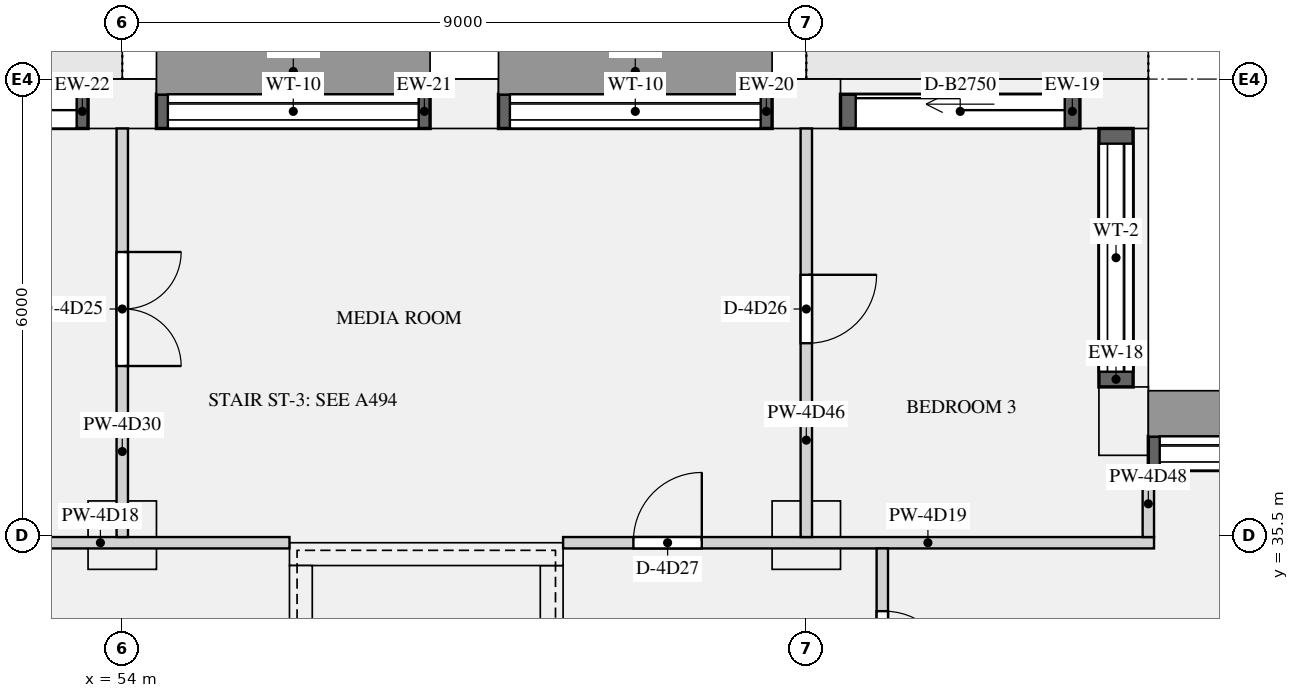
"""IFC4 building model, lengths in metres.
Left out: names, types, materials, properties, quantities, classifications, styles, units other than length and angle.
Written with IfcOpenShell. Run it as: python <this file> out.ifc"""

import sys

from ifc_helpers import new_model, si_unit, direction, frame, frame_2d, origin, origin_2d, place, context, subcontext, project, spatial, rectangle, extrude, element, fill, save


model = new_model("IFC4")
c1 = context("Model", 3, precision=1e-05, world=origin(), true_north=direction((0.0, 1.0)))
c2 = subcontext(c1, "Body", "Model", "MODEL_VIEW")
j1 = project(units=[si_unit("LENGTHUNIT", "METRE"), si_unit("PLANEANGLEUNIT", "RADIAN")], contexts=[c1])
p1 = place(None, origin())
s1 = spatial("IfcSite", under=j1, at=p1, CompositionType="ELEMENT")
p2 = place(p1, origin())
s2 = spatial("IfcBuilding", under=s1, at=p2, CompositionType="ELEMENT")
p3 = place(p2, frame((0.0, 0.0, 223.2)))
s3 = spatial("IfcBuildingStorey", under=s2, at=p3, CompositionType="ELEMENT", Elevation=223.2)
for number, where, z_axis, x_axis in (
    (1, (67.175, 37.0, 0.0), (0.0, 0.0, 1.0), (0.0, 1.0, 0.0)),
    (2, (67.05, 41.175, 0.0), (0.0, 0.0, 1.0), (-1.0, 0.0, 0.0)),
    (3, (63.0, 41.175, 0.0), (0.0, 0.0, 1.0), (-1.0, 0.0, 0.0)),
    (4, (58.5, 41.175, 0.0), (0.0, 0.0, 1.0), (-1.0, 0.0, 0.0)),
    (5, (54.0, 41.175, 0.0), (0.0, 0.0, 1.0), (-1.0, 0.0, 0.0)),
):
    element("IfcColumn", number, at=place(p3, frame(where, z_axis=z_axis, x_axis=x_axis)), inside=s3, PredefinedType="USERDEFINED", context=c2, shape_type="SweptSolid", body=[
        extrude(rectangle(XDim=0.9, YDim=0.65, at=origin_2d()), origin(), (0.0, 0.0, 1.0), 3.15),
    ])
for number, where, z_axis, x_axis in (
    (6, (54.0, 35.5, 0.0), (0.0, 0.0, 1.0), (1.0, 0.0, 0.0)),
    (7, (63.0, 35.5, 0.0), (0.0, 0.0, 1.0), (1.0, 0.0, 0.0)),
):
    element("IfcColumn", number, at=place(p3, frame(where, z_axis=z_axis, x_axis=x_axis)), inside=s3, PredefinedType="COLUMN", context=c2, shape_type="SweptSolid", body=[
        extrude(rectangle(XDim=0.9, YDim=0.9, at=origin_2d()), origin(), (0.0, 0.0, 1.0), 3.15),
    ])
p4 = place(p3, frame((56.2, 35.25, 0.0), z_axis=(0.0, 0.0, 1.0), x_axis=(1.0, 0.0, 0.0)))
e8 = element("IfcWall", 8, at=p4, inside=s3, PredefinedType="SHEAR", context=c2, shape_type="SweptSolid", body=[
    extrude(rectangle(XDim=3.6, YDim=0.3, at=frame_2d((1.8, 0.0))), origin(), (0.0, 0.0, 1.0), 3.15),
])
for number, where, z_axis, x_axis in (
    (9, (56.35, 27.3, 0.0), (0.0, 0.0, 1.0), (0.0, 1.0, 0.0)),
    (10, (59.65, 27.3, 0.0), (0.0, 0.0, 1.0), (0.0, 1.0, 0.0)),
):
    element("IfcWall", number, at=place(p3, frame(where, z_axis=z_axis, x_axis=x_axis)), inside=s3, PredefinedType="SHEAR", context=c2, shape_type="SweptSolid", body=[
        extrude(rectangle(XDim=7.8, YDim=0.3, at=frame_2d((3.9, 0.0))), origin(), (0.0, 0.0, 1.0), 3.15),
    ])
p5 = place(p3, frame((71.1, 36.575, 0.9), z_axis=(0.0, 0.0, 1.0), x_axis=(-1.0, 0.0, 0.0)))
e11 = element("IfcWall", 11, at=p5, inside=s3, PredefinedType="SOLIDWALL", context=c2, shape_type="SweptSolid", body=[
    extrude(rectangle(XDim=3.6, YDim=0.45, at=frame_2d((1.8, 0.0))), origin(), (0.0, 0.0, 1.0), 1.93),
])
p6 = place(p5, frame((0.15, 0.0, 0.15)))
e12 = element("IfcOpeningElement", 12, at=p6, cuts=e11, PredefinedType="OPENING", context=c2, shape_type="SweptSolid", body=[
    extrude(rectangle(XDim=3.3, YDim=1.5, at=frame_2d((1.65, 0.75))), frame((0.0, 0.235, 0.0), z_axis=(0.0, -1.0, 0.0), x_axis=(1.0, 0.0, 0.0)), (0.0, 0.0, 1.0), 0.47),
])
p7 = place(p3, frame((67.075, 37.45, 0.9), z_axis=(0.0, 0.0, 1.0), x_axis=(0.0, 1.0, 0.0)))
e13 = element("IfcWall", 13, at=p7, inside=s3, PredefinedType="SOLIDWALL", context=c2, shape_type="SweptSolid", body=[
    extrude(rectangle(XDim=3.4, YDim=0.45, at=frame_2d((1.7, 0.0))), origin(), (0.0, 0.0, 1.0), 1.93),
])
p8 = place(p7, frame((0.2, 0.0, 0.15)))
e14 = element("IfcOpeningElement", 14, at=p8, cuts=e13, PredefinedType="OPENING", context=c2, shape_type="SweptSolid", body=[
    extrude(rectangle(XDim=3.0, YDim=1.5, at=frame_2d((1.5, 0.75))), frame((0.0, 0.235, 0.0), z_axis=(0.0, -1.0, 0.0), x_axis=(1.0, 0.0, 0.0)), (0.0, 0.0, 1.0), 0.47),
])
p9 = place(p3, frame((66.6, 41.075, 0.0), z_axis=(0.0, 0.0, 1.0), x_axis=(-1.0, 0.0, 0.0)))
e15 = element("IfcWall", 15, at=p9, inside=s3, PredefinedType="SOLIDWALL", context=c2, shape_type="SweptSolid", body=[
    extrude(rectangle(XDim=3.15, YDim=0.45, at=frame_2d((1.575, 0.0))), origin(), (0.0, 0.0, 1.0), 2.83),
])
p10 = place(p9, frame((0.2, 0.0, 0.0)))
e16 = element("IfcOpeningElement", 16, at=p10, cuts=e15, PredefinedType="OPENING", context=c2, shape_type="SweptSolid", body=[
    extrude(rectangle(XDim=2.75, YDim=2.3, at=frame_2d((1.375, 1.15))), frame((0.0, 0.235, 0.0), z_axis=(0.0, -1.0, 0.0), x_axis=(1.0, 0.0, 0.0)), (0.0, 0.0, 1.0), 0.47),
])
p11 = place(p3, frame((62.55, 41.075, 0.9), z_axis=(0.0, 0.0, 1.0), x_axis=(-1.0, 0.0, 0.0)))
e17 = element("IfcWall", 17, at=p11, inside=s3, PredefinedType="SOLIDWALL", context=c2, shape_type="SweptSolid", body=[
    extrude(rectangle(XDim=3.6, YDim=0.45, at=frame_2d((1.8, 0.0))), origin(), (0.0, 0.0, 1.0), 1.93),
])
p12 = place(p11, frame((0.15, 0.0, 0.15)))
e18 = element("IfcOpeningElement", 18, at=p12, cuts=e17, PredefinedType="OPENING", context=c2, shape_type="SweptSolid", body=[
    extrude(rectangle(XDim=3.3, YDim=1.5, at=frame_2d((1.65, 0.75))), frame((0.0, 0.235, 0.0), z_axis=(0.0, -1.0, 0.0), x_axis=(1.0, 0.0, 0.0)), (0.0, 0.0, 1.0), 0.47),
])
p13 = place(p3, frame((58.05, 41.075, 0.9), z_axis=(0.0, 0.0, 1.0), x_axis=(-1.0, 0.0, 0.0)))
e19 = element("IfcWall", 19, at=p13, inside=s3, PredefinedType="SOLIDWALL", context=c2, shape_type="SweptSolid", body=[
    extrude(rectangle(XDim=3.6, YDim=0.45, at=frame_2d((1.8, 0.0))), origin(), (0.0, 0.0, 1.0), 1.93),
])
p14 = place(p13, frame((0.15, 0.0, 0.15)))
e20 = element("IfcOpeningElement", 20, at=p14, cuts=e19, PredefinedType="OPENING", context=c2, shape_type="SweptSolid", body=[
    extrude(rectangle(XDim=3.3, YDim=1.5, at=frame_2d((1.65, 0.75))), frame((0.0, 0.235, 0.0), z_axis=(0.0, -1.0, 0.0), x_axis=(1.0, 0.0, 0.0)), (0.0, 0.0, 1.0), 0.47),
])
p15 = place(p3, frame((53.55, 41.075, 0.0), z_axis=(0.0, 0.0, 1.0), x_axis=(-1.0, 0.0, 0.0)))
e21 = element("IfcWall", 21, at=p15, inside=s3, PredefinedType="SOLIDWALL", context=c2, shape_type="SweptSolid", body=[
    extrude(rectangle(XDim=3.6, YDim=0.45, at=frame_2d((1.8, 0.0))), origin(), (0.0, 0.0, 1.0), 2.83),
])
p16 = place(p15, frame((0.15, 0.0, 0.0)))
e22 = element("IfcOpeningElement", 22, at=p16, cuts=e21, PredefinedType="OPENING", context=c2, shape_type="SweptSolid", body=[
    extrude(rectangle(XDim=3.3, YDim=2.3, at=frame_2d((1.65, 1.15))), frame((0.0, 0.235, 0.0), z_axis=(0.0, -1.0, 0.0), x_axis=(1.0, 0.0, 0.0)), (0.0, 0.0, 1.0), 0.47),
])
p17 = place(p3, frame((45.0, 35.4, 0.0), z_axis=(0.0, 0.0, 1.0), x_axis=(1.0, 0.0, 0.0)))
e23 = element("IfcWall", 23, at=p17, inside=s3, PredefinedType="PARTITIONING", context=c2, shape_type="SweptSolid", body=[
    extrude(rectangle(XDim=11.2, YDim=0.15, at=frame_2d((5.6, 0.0))), origin(), (0.0, 0.0, 1.0), 2.83),
])
p18 = place(p17, frame((5.325, 0.0, 0.0)))
e24 = element("IfcOpeningElement", 24, at=p18, cuts=e23, PredefinedType="OPENING", context=c2, shape_type="SweptSolid", body=[
    extrude(rectangle(XDim=0.9, YDim=2.1, at=frame_2d((0.45, 1.05))), frame((0.0, 0.085, 0.0), z_axis=(0.0, -1.0, 0.0), x_axis=(1.0, 0.0, 0.0)), (0.0, 0.0, 1.0), 0.17),
])
p19 = place(p17, frame((0.975, 0.0, 0.0)))
e25 = element("IfcOpeningElement", 25, at=p19, cuts=e23, PredefinedType="OPENING", context=c2, shape_type="SweptSolid", body=[
    extrude(rectangle(XDim=1.5, YDim=2.1, at=frame_2d((0.75, 1.05))), frame((0.0, 0.085, 0.0), z_axis=(0.0, -1.0, 0.0), x_axis=(1.0, 0.0, 0.0)), (0.0, 0.0, 1.0), 0.17),
])
p20 = place(p3, frame((59.8, 35.4, 0.0), z_axis=(0.0, 0.0, 1.0), x_axis=(1.0, 0.0, 0.0)))
e26 = element("IfcWall", 26, at=p20, inside=s3, PredefinedType="PARTITIONING", context=c2, shape_type="SweptSolid", body=[
    extrude(rectangle(XDim=7.775, YDim=0.15, at=frame_2d((3.887, 0.0))), origin(), (0.0, 0.0, 1.0), 2.83),
])
p21 = place(p20, frame((0.925, 0.0, 0.0)))
e27 = element("IfcOpeningElement", 27, at=p21, cuts=e26, PredefinedType="OPENING", context=c2, shape_type="SweptSolid", body=[
    extrude(rectangle(XDim=0.9, YDim=2.1, at=frame_2d((0.45, 1.05))), frame((0.0, 0.085, 0.0), z_axis=(0.0, -1.0, 0.0), x_axis=(1.0, 0.0, 0.0)), (0.0, 0.0, 1.0), 0.17),
])
p22 = place(p3, frame((54.0, 35.475, 0.0), z_axis=(0.0, 0.0, 1.0), x_axis=(0.0, 1.0, 0.0)))
e28 = element("IfcWall", 28, at=p22, inside=s3, PredefinedType="PARTITIONING", context=c2, shape_type="SweptSolid", body=[
    extrude(rectangle(XDim=5.375, YDim=0.15, at=frame_2d((2.688, 0.0))), origin(), (0.0, 0.0, 1.0), 2.83),
])
p23 = place(p22, frame((2.25, 0.0, 0.0)))
e29 = element("IfcOpeningElement", 29, at=p23, cuts=e28, PredefinedType="OPENING", context=c2, shape_type="SweptSolid", body=[
    extrude(rectangle(XDim=1.5, YDim=2.1, at=frame_2d((0.75, 1.05))), frame((0.0, 0.085, 0.0), z_axis=(0.0, -1.0, 0.0), x_axis=(1.0, 0.0, 0.0)), (0.0, 0.0, 1.0), 0.17),
])
p24 = place(p3, frame((63.0, 35.475, 0.0), z_axis=(0.0, 0.0, 1.0), x_axis=(0.0, 1.0, 0.0)))
e30 = element("IfcWall", 30, at=p24, inside=s3, PredefinedType="PARTITIONING", context=c2, shape_type="SweptSolid", body=[
    extrude(rectangle(XDim=5.375, YDim=0.15, at=frame_2d((2.688, 0.0))), origin(), (0.0, 0.0, 1.0), 2.83),
])
p25 = place(p24, frame((2.55, 0.0, 0.0)))
e31 = element("IfcOpeningElement", 31, at=p25, cuts=e30, PredefinedType="OPENING", context=c2, shape_type="SweptSolid", body=[
    extrude(rectangle(XDim=0.9, YDim=2.1, at=frame_2d((0.45, 1.05))), frame((0.0, 0.085, 0.0), z_axis=(0.0, -1.0, 0.0), x_axis=(1.0, 0.0, 0.0)), (0.0, 0.0, 1.0), 0.17),
])
p26 = place(p3, frame((67.5, 35.475, 0.0), z_axis=(0.0, 0.0, 1.0), x_axis=(0.0, 1.0, 0.0)))
e32 = element("IfcWall", 32, at=p26, inside=s3, PredefinedType="PARTITIONING", context=c2, shape_type="SweptSolid", body=[
    extrude(rectangle(XDim=0.875, YDim=0.15, at=frame_2d((0.438, 0.0))), origin(), (0.0, 0.0, 1.0), 2.83),
])
p27 = place(p3, frame((64.0, 28.575, 0.0), z_axis=(0.0, 0.0, 1.0), x_axis=(0.0, 1.0, 0.0)))
e33 = element("IfcWall", 33, at=p27, inside=s3, PredefinedType="PARTITIONING", context=c2, shape_type="SweptSolid", body=[
    extrude(rectangle(XDim=6.75, YDim=0.15, at=frame_2d((3.375, 0.0))), origin(), (0.0, 0.0, 1.0), 2.83),
])
p28 = place(p27, frame((1.6, 0.0, 0.0)))
e34 = element("IfcOpeningElement", 34, at=p28, cuts=e33, PredefinedType="OPENING", context=c2, shape_type="SweptSolid", body=[
    extrude(rectangle(XDim=0.9, YDim=2.1, at=frame_2d((0.45, 1.05))), frame((0.0, 0.085, 0.0), z_axis=(0.0, -1.0, 0.0), x_axis=(1.0, 0.0, 0.0)), (0.0, 0.0, 1.0), 0.17),
])
p29 = place(p27, frame((5.025, 0.0, 0.0)))
e35 = element("IfcOpeningElement", 35, at=p29, cuts=e33, PredefinedType="OPENING", context=c2, shape_type="SweptSolid", body=[
    extrude(rectangle(XDim=0.9, YDim=2.1, at=frame_2d((0.45, 1.05))), frame((0.0, 0.085, 0.0), z_axis=(0.0, -1.0, 0.0), x_axis=(1.0, 0.0, 0.0)), (0.0, 0.0, 1.0), 0.17),
])
p30 = place(p6, origin())
e36 = element("IfcWindow", 36, at=p30, inside=s3, PartitioningType="SINGLE_PANEL", PredefinedType="WINDOW", context=c2, shape_type="SweptSolid", body=[
    extrude(rectangle(XDim=3.3, YDim=1.5, at=frame_2d((1.65, 0.75))), frame((0.0, -0.065, 0.0), z_axis=(0.0, -1.0, 0.0), x_axis=(1.0, 0.0, 0.0)), (0.0, 0.0, 1.0), 0.06),
])
fill(e12, e36)
p31 = place(p8, origin())
e37 = element("IfcWindow", 37, at=p31, inside=s3, PartitioningType="SINGLE_PANEL", PredefinedType="WINDOW", context=c2, shape_type="SweptSolid", body=[
    extrude(rectangle(XDim=3.0, YDim=1.5, at=frame_2d((1.5, 0.75))), frame((0.0, -0.065, 0.0), z_axis=(0.0, -1.0, 0.0), x_axis=(1.0, 0.0, 0.0)), (0.0, 0.0, 1.0), 0.06),
])
fill(e14, e37)
p32 = place(p10, origin())
e38 = element("IfcDoor", 38, at=p32, inside=s3, OperationType="SLIDING_TO_LEFT", PredefinedType="DOOR", context=c2, shape_type="SweptSolid", body=[
    extrude(rectangle(XDim=2.75, YDim=2.3, at=frame_2d((1.375, 1.15))), frame((0.0, -0.07, 0.0), z_axis=(0.0, -1.0, 0.0), x_axis=(1.0, 0.0, 0.0)), (0.0, 0.0, 1.0), 0.05),
])
fill(e16, e38)
p33 = place(p12, origin())
e39 = element("IfcWindow", 39, at=p33, inside=s3, PartitioningType="SINGLE_PANEL", PredefinedType="WINDOW", context=c2, shape_type="SweptSolid", body=[
    extrude(rectangle(XDim=3.3, YDim=1.5, at=frame_2d((1.65, 0.75))), frame((0.0, -0.065, 0.0), z_axis=(0.0, -1.0, 0.0), x_axis=(1.0, 0.0, 0.0)), (0.0, 0.0, 1.0), 0.06),
])
fill(e18, e39)
p34 = place(p14, origin())
e40 = element("IfcWindow", 40, at=p34, inside=s3, PartitioningType="SINGLE_PANEL", PredefinedType="WINDOW", context=c2, shape_type="SweptSolid", body=[
    extrude(rectangle(XDim=3.3, YDim=1.5, at=frame_2d((1.65, 0.75))), frame((0.0, -0.065, 0.0), z_axis=(0.0, -1.0, 0.0), x_axis=(1.0, 0.0, 0.0)), (0.0, 0.0, 1.0), 0.06),
])
fill(e20, e40)
p35 = place(p16, origin())
e41 = element("IfcDoor", 41, at=p35, inside=s3, OperationType="SLIDING_TO_LEFT", PredefinedType="DOOR", context=c2, shape_type="SweptSolid", body=[
    extrude(rectangle(XDim=3.3, YDim=2.3, at=frame_2d((1.65, 1.15))), frame((0.0, -0.07, 0.0), z_axis=(0.0, -1.0, 0.0), x_axis=(1.0, 0.0, 0.0)), (0.0, 0.0, 1.0), 0.05),
])
fill(e22, e41)
p36 = place(p23, frame((1.5, 0.0, 0.0), z_axis=(0.0, 0.0, 1.0), x_axis=(-1.0, 0.0, 0.0)))
e42 = element("IfcDoor", 42, at=p36, inside=s3, OperationType="DOUBLE_DOOR_SINGLE_SWING", PredefinedType="DOOR", context=c2, shape_type="SweptSolid", body=[
    extrude(rectangle(XDim=1.5, YDim=2.1, at=frame_2d((0.75, 1.05))), frame((0.0, 0.025, 0.0), z_axis=(0.0, -1.0, 0.0), x_axis=(1.0, 0.0, 0.0)), (0.0, 0.0, 1.0), 0.05),
])
fill(e29, e42)
p37 = place(p25, frame((0.9, 0.0, 0.0), z_axis=(0.0, 0.0, 1.0), x_axis=(-1.0, 0.0, 0.0)))
e43 = element("IfcDoor", 43, at=p37, inside=s3, OperationType="SINGLE_SWING_LEFT", PredefinedType="DOOR", context=c2, shape_type="SweptSolid", body=[
    extrude(rectangle(XDim=0.9, YDim=2.1, at=frame_2d((0.45, 1.05))), frame((0.0, 0.025, 0.0), z_axis=(0.0, -1.0, 0.0), x_axis=(1.0, 0.0, 0.0)), (0.0, 0.0, 1.0), 0.05),
])
fill(e31, e43)
p38 = place(p21, origin())
e44 = element("IfcDoor", 44, at=p38, inside=s3, OperationType="SINGLE_SWING_RIGHT", PredefinedType="DOOR", context=c2, shape_type="SweptSolid", body=[
    extrude(rectangle(XDim=0.9, YDim=2.1, at=frame_2d((0.45, 1.05))), frame((0.0, 0.025, 0.0), z_axis=(0.0, -1.0, 0.0), x_axis=(1.0, 0.0, 0.0)), (0.0, 0.0, 1.0), 0.05),
])
fill(e27, e44)
p39 = place(p29, frame((0.9, 0.0, 0.0), z_axis=(0.0, 0.0, 1.0), x_axis=(-1.0, 0.0, 0.0)))
e45 = element("IfcDoor", 45, at=p39, inside=s3, OperationType="SINGLE_SWING_RIGHT", PredefinedType="DOOR", context=c2, shape_type="SweptSolid", body=[
    extrude(rectangle(XDim=0.9, YDim=2.1, at=frame_2d((0.45, 1.05))), frame((0.0, 0.025, 0.0), z_axis=(0.0, -1.0, 0.0), x_axis=(1.0, 0.0, 0.0)), (0.0, 0.0, 1.0), 0.05),
])
fill(e35, e45)
save(model, sys.argv[1])
